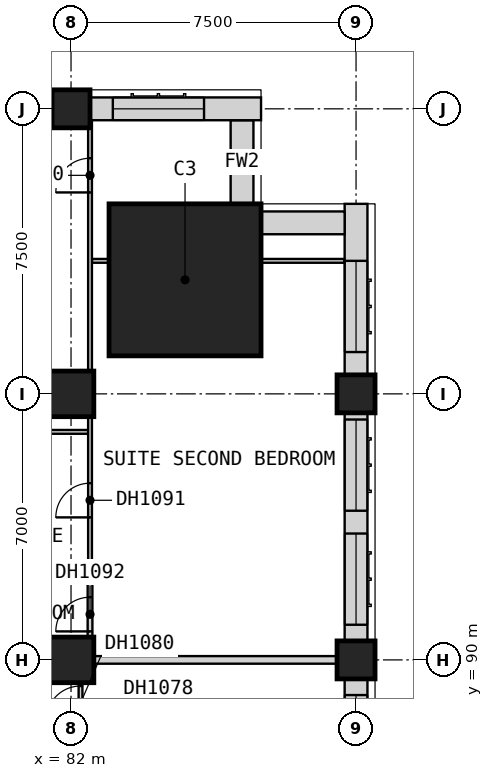
"""IFC4 building model, lengths in metres.
Left out: names, types, materials, properties, quantities, classifications, styles, units other than length and angle.
Written with IfcOpenShell. Run it as: python <this file> out.ifc"""

import sys

from ifc_helpers import new_model, si_unit, direction, frame, frame_2d, origin, origin_2d, place, context, subcontext, project, spatial, rectangle, extrude, element, fill, save


model = new_model("IFC4")
c1 = context("Model", 3, precision=1e-05, world=origin(), true_north=direction((0.0, 1.0)))
c2 = subcontext(c1, "Body", "Model", "MODEL_VIEW")
j1 = project(units=[si_unit("LENGTHUNIT", "METRE"), si_unit("PLANEANGLEUNIT", "RADIAN")], contexts=[c1])
p1 = place(None, origin())
s1 = spatial("IfcSite", under=j1, at=p1, CompositionType="ELEMENT")
p2 = place(p1, origin())
s2 = spatial("IfcBuilding", under=s1, at=p2, CompositionType="ELEMENT")
p3 = place(p2, frame((0.0, 0.0, 48.4)))
s3 = spatial("IfcBuildingStorey", under=s2, at=p3, CompositionType="ELEMENT", Elevation=48.4)
for number, where, z_axis, x_axis in (
    (1, (82.0, 90.0, 0.0), (0.0, 0.0, 1.0), (1.0, 0.0, 0.0)),
    (2, (82.0, 97.0, 0.0), (0.0, 0.0, 1.0), (1.0, 0.0, 0.0)),
):
    element("IfcColumn", number, at=place(p3, frame(where, z_axis=z_axis, x_axis=x_axis)), inside=s3, PredefinedType="COLUMN", context=c2, shape_type="SweptSolid", body=[
        extrude(rectangle(XDim=1.2, YDim=1.2, at=origin_2d()), origin(), (0.0, 0.0, 1.0), 3.6),
    ])
for number, where, z_axis, x_axis in (
    (3, (82.0, 104.5, 0.0), (0.0, 0.0, 1.0), (1.0, 0.0, 0.0)),
    (4, (89.5, 90.0, 0.0), (0.0, 0.0, 1.0), (1.0, 0.0, 0.0)),
    (5, (89.5, 97.0, 0.0), (0.0, 0.0, 1.0), (1.0, 0.0, 0.0)),
):
    element("IfcColumn", number, at=place(p3, frame(where, z_axis=z_axis, x_axis=x_axis)), inside=s3, PredefinedType="COLUMN", context=c2, shape_type="SweptSolid", body=[
        extrude(rectangle(XDim=1.0, YDim=1.0, at=origin_2d()), origin(), (0.0, 0.0, 1.0), 3.6),
    ])
p4 = place(p3, frame((85.0, 100.0, 0.0), z_axis=(0.0, 0.0, 1.0), x_axis=(1.0, 0.0, 0.0)))
e6 = element("IfcColumn", 6, at=p4, inside=s3, PredefinedType="COLUMN", context=c2, shape_type="SweptSolid", body=[
    extrude(rectangle(XDim=4.0, YDim=4.0, at=origin_2d()), origin(), (0.0, 0.0, 1.0), 3.6),
])
p5 = place(p3, frame((89.5, 83.0, 0.0), z_axis=(0.0, 0.0, 1.0), x_axis=(0.0, 1.0, 0.0)))
e7 = element("IfcWall", 7, at=p5, inside=s3, PredefinedType="SOLIDWALL", context=c2, shape_type="SweptSolid", body=[
    extrude(rectangle(XDim=6.5, YDim=0.6, at=frame_2d((3.25, 0.0))), origin(), (0.0, 0.0, 1.0), 2.85),
])
p6 = place(p5, frame((0.425, 0.0, 0.8)))
e8 = element("IfcOpeningElement", 8, at=p6, cuts=e7, PredefinedType="OPENING", context=c2, shape_type="SweptSolid", body=[
    extrude(rectangle(XDim=2.4, YDim=1.8, at=frame_2d((1.2, 0.9))), frame((0.0, 0.31, 0.0), z_axis=(0.0, -1.0, 0.0), x_axis=(1.0, 0.0, 0.0)), (0.0, 0.0, 1.0), 0.62),
])
p7 = place(p5, frame((3.675, 0.0, 0.8)))
e9 = element("IfcOpeningElement", 9, at=p7, cuts=e7, PredefinedType="OPENING", context=c2, shape_type="SweptSolid", body=[
    extrude(rectangle(XDim=2.4, YDim=1.8, at=frame_2d((1.2, 0.9))), frame((0.0, 0.31, 0.0), z_axis=(0.0, -1.0, 0.0), x_axis=(1.0, 0.0, 0.0)), (0.0, 0.0, 1.0), 0.62),
])
p8 = place(p3, frame((89.5, 90.5, 0.0), z_axis=(0.0, 0.0, 1.0), x_axis=(0.0, 1.0, 0.0)))
e10 = element("IfcWall", 10, at=p8, inside=s3, PredefinedType="SOLIDWALL", context=c2, shape_type="SweptSolid", body=[
    extrude(rectangle(XDim=6.0, YDim=0.6, at=frame_2d((3.0, 0.0))), origin(), (0.0, 0.0, 1.0), 2.85),
])
p9 = place(p8, frame((0.425, 0.0, 0.8)))
e11 = element("IfcOpeningElement", 11, at=p9, cuts=e10, PredefinedType="OPENING", context=c2, shape_type="SweptSolid", body=[
    extrude(rectangle(XDim=2.4, YDim=1.8, at=frame_2d((1.2, 0.9))), frame((0.0, 0.31, 0.0), z_axis=(0.0, -1.0, 0.0), x_axis=(1.0, 0.0, 0.0)), (0.0, 0.0, 1.0), 0.62),
])
p10 = place(p8, frame((3.425, 0.0, 0.8)))
e12 = element("IfcOpeningElement", 12, at=p10, cuts=e10, PredefinedType="OPENING", context=c2, shape_type="SweptSolid", body=[
    extrude(rectangle(XDim=2.4, YDim=1.8, at=frame_2d((1.2, 0.9))), frame((0.0, 0.31, 0.0), z_axis=(0.0, -1.0, 0.0), x_axis=(1.0, 0.0, 0.0)), (0.0, 0.0, 1.0), 0.62),
])
p11 = place(p3, frame((89.5, 97.5, 0.0), z_axis=(0.0, 0.0, 1.0), x_axis=(0.0, 1.0, 0.0)))
e13 = element("IfcWall", 13, at=p11, inside=s3, PredefinedType="SOLIDWALL", context=c2, shape_type="SweptSolid", body=[
    extrude(rectangle(XDim=4.5, YDim=0.6, at=frame_2d((2.25, 0.0))), origin(), (0.0, 0.0, 1.0), 3.35),
])
p12 = place(p11, frame((0.6, 0.0, 0.8)))
e14 = element("IfcOpeningElement", 14, at=p12, cuts=e13, PredefinedType="OPENING", context=c2, shape_type="SweptSolid", body=[
    extrude(rectangle(XDim=2.4, YDim=1.8, at=frame_2d((1.2, 0.9))), frame((0.0, 0.31, 0.0), z_axis=(0.0, -1.0, 0.0), x_axis=(1.0, 0.0, 0.0)), (0.0, 0.0, 1.0), 0.62),
])
for number, where, z_axis, x_axis in (
    (15, (89.2, 101.5, 0.0), (0.0, 0.0, 1.0), (-1.0, 0.0, 0.0)),
    (16, (86.5, 102.0, 0.0), (0.0, 0.0, 1.0), (0.0, 1.0, 0.0)),
):
    element("IfcWall", number, at=place(p3, frame(where, z_axis=z_axis, x_axis=x_axis)), inside=s3, PredefinedType="SOLIDWALL", context=c2, shape_type="SweptSolid", body=[
        extrude(rectangle(XDim=2.2, YDim=0.6, at=frame_2d((1.1, 0.0))), origin(), (0.0, 0.0, 1.0), 3.35),
    ])
p13 = place(p3, frame((87.0, 104.5, 0.0), z_axis=(0.0, 0.0, 1.0), x_axis=(-1.0, 0.0, 0.0)))
e17 = element("IfcWall", 17, at=p13, inside=s3, PredefinedType="SOLIDWALL", context=c2, shape_type="SweptSolid", body=[
    extrude(rectangle(XDim=4.5, YDim=0.6, at=frame_2d((2.25, 0.0))), origin(), (0.0, 0.0, 1.0), 3.35),
])
p14 = place(p13, frame((1.5, 0.0, 0.8)))
e18 = element("IfcOpeningElement", 18, at=p14, cuts=e17, PredefinedType="OPENING", context=c2, shape_type="SweptSolid", body=[
    extrude(rectangle(XDim=2.4, YDim=1.8, at=frame_2d((1.2, 0.9))), frame((0.0, 0.31, 0.0), z_axis=(0.0, -1.0, 0.0), x_axis=(1.0, 0.0, 0.0)), (0.0, 0.0, 1.0), 0.62),
])
p15 = place(p3, frame((77.475, 90.0, 0.0), z_axis=(0.0, 0.0, 1.0), x_axis=(1.0, 0.0, 0.0)))
e19 = element("IfcWall", 19, at=p15, inside=s3, PredefinedType="PARTITIONING", context=c2, shape_type="SweptSolid", body=[
    extrude(rectangle(XDim=12.525, YDim=0.2, at=frame_2d((6.262, 0.0))), origin(), (0.0, 0.0, 1.0), 3.35),
])
p16 = place(p3, frame((75.1, 96.0, 0.0), z_axis=(0.0, 0.0, 1.0), x_axis=(1.0, 0.0, 0.0)))
e20 = element("IfcWall", 20, at=p16, inside=s3, PredefinedType="PARTITIONING", context=c2, shape_type="SweptSolid", body=[
    extrude(rectangle(XDim=7.35, YDim=0.1, at=frame_2d((3.675, 0.0))), origin(), (0.0, 0.0, 1.0), 3.35),
])
p17 = place(p16, frame((0.65, 0.0, 0.0)))
e21 = element("IfcOpeningElement", 21, at=p17, cuts=e20, PredefinedType="OPENING", context=c2, shape_type="SweptSolid", body=[
    extrude(rectangle(XDim=0.9, YDim=2.1, at=frame_2d((0.45, 1.05))), frame((0.0, 0.06, 0.0), z_axis=(0.0, -1.0, 0.0), x_axis=(1.0, 0.0, 0.0)), (0.0, 0.0, 1.0), 0.12),
])
p18 = place(p3, frame((82.55, 100.5, 0.0), z_axis=(0.0, 0.0, 1.0), x_axis=(1.0, 0.0, 0.0)))
e22 = element("IfcWall", 22, at=p18, inside=s3, PredefinedType="PARTITIONING", context=c2, shape_type="SweptSolid", body=[
    extrude(rectangle(XDim=6.64, YDim=0.1, at=frame_2d((3.32, 0.0))), origin(), (0.0, 0.0, 1.0), 3.35),
])
p19 = place(p3, frame((82.25, 88.188, 0.0), z_axis=(0.0, 0.0, 1.0), x_axis=(0.0, 1.0, 0.0)))
e23 = element("IfcWall", 23, at=p19, inside=s3, PredefinedType="PARTITIONING", context=c2, shape_type="SweptSolid", body=[
    extrude(rectangle(XDim=1.712, YDim=0.1, at=frame_2d((0.856, 0.0))), origin(), (0.0, 0.0, 1.0), 3.35),
])
p20 = place(p19, frame((0.225, 0.0, 0.0)))
e24 = element("IfcOpeningElement", 24, at=p20, cuts=e23, PredefinedType="OPENING", context=c2, shape_type="SweptSolid", body=[
    extrude(rectangle(XDim=0.9, YDim=2.1, at=frame_2d((0.45, 1.05))), frame((0.0, 0.06, 0.0), z_axis=(0.0, -1.0, 0.0), x_axis=(1.0, 0.0, 0.0)), (0.0, 0.0, 1.0), 0.12),
])
p21 = place(p3, frame((82.5, 92.462, 0.0), z_axis=(0.0, 0.0, 1.0), x_axis=(0.0, 1.0, 0.0)))
e25 = element("IfcWall", 25, at=p21, inside=s3, PredefinedType="PARTITIONING", context=c2, shape_type="SweptSolid", body=[
    extrude(rectangle(XDim=11.728, YDim=0.1, at=frame_2d((5.864, 0.0))), origin(), (0.0, 0.0, 1.0), 3.35),
])
p22 = place(p21, frame((9.837, 0.0, 0.0)))
e26 = element("IfcOpeningElement", 26, at=p22, cuts=e25, PredefinedType="OPENING", context=c2, shape_type="SweptSolid", body=[
    extrude(rectangle(XDim=0.9, YDim=2.1, at=frame_2d((0.45, 1.05))), frame((0.0, 0.06, 0.0), z_axis=(0.0, -1.0, 0.0), x_axis=(1.0, 0.0, 0.0)), (0.0, 0.0, 1.0), 0.12),
])
p23 = place(p21, frame((1.288, 0.0, 0.0)))
e27 = element("IfcOpeningElement", 27, at=p23, cuts=e25, PredefinedType="OPENING", context=c2, shape_type="SweptSolid", body=[
    extrude(rectangle(XDim=0.9, YDim=2.1, at=frame_2d((0.45, 1.05))), frame((0.0, 0.06, 0.0), z_axis=(0.0, -1.0, 0.0), x_axis=(1.0, 0.0, 0.0)), (0.0, 0.0, 1.0), 0.12),
])
p24 = place(p3, frame((77.475, 92.4, 0.0), z_axis=(0.0, 0.0, 1.0), x_axis=(1.0, 0.0, 0.0)))
e28 = element("IfcWall", 28, at=p24, inside=s3, PredefinedType="PARTITIONING", context=c2, shape_type="SweptSolid", body=[
    extrude(rectangle(XDim=5.025, YDim=0.125, at=frame_2d((2.512, 0.0))), origin(), (0.0, 0.0, 1.0), 3.35),
])
p25 = place(p3, frame((82.5, 90.1, 0.0), z_axis=(0.0, 0.0, 1.0), x_axis=(0.0, 1.0, 0.0)))
e29 = element("IfcWall", 29, at=p25, inside=s3, PredefinedType="PARTITIONING", context=c2, shape_type="SweptSolid", body=[
    extrude(rectangle(XDim=2.237, YDim=0.125, at=frame_2d((1.119, 0.0))), origin(), (0.0, 0.0, 1.0), 3.35),
])
p26 = place(p25, frame((0.65, 0.0, 0.0)))
e30 = element("IfcOpeningElement", 30, at=p26, cuts=e29, PredefinedType="OPENING", context=c2, shape_type="SweptSolid", body=[
    extrude(rectangle(XDim=0.9, YDim=2.1, at=frame_2d((0.45, 1.05))), frame((0.0, 0.073, 0.0), z_axis=(0.0, -1.0, 0.0), x_axis=(1.0, 0.0, 0.0)), (0.0, 0.0, 1.0), 0.145),
])
p27 = place(p7, origin())
e31 = element("IfcWindow", 31, at=p27, inside=s3, PartitioningType="SINGLE_PANEL", PredefinedType="WINDOW", context=c2, shape_type="SweptSolid", body=[
    extrude(rectangle(XDim=2.4, YDim=1.8, at=frame_2d((1.2, 0.9))), frame((0.0, -0.07, 0.0), z_axis=(0.0, -1.0, 0.0), x_axis=(1.0, 0.0, 0.0)), (0.0, 0.0, 1.0), 0.06),
])
fill(e9, e31)
p28 = place(p9, origin())
e32 = element("IfcWindow", 32, at=p28, inside=s3, PartitioningType="SINGLE_PANEL", PredefinedType="WINDOW", context=c2, shape_type="SweptSolid", body=[
    extrude(rectangle(XDim=2.4, YDim=1.8, at=frame_2d((1.2, 0.9))), frame((0.0, -0.07, 0.0), z_axis=(0.0, -1.0, 0.0), x_axis=(1.0, 0.0, 0.0)), (0.0, 0.0, 1.0), 0.06),
])
fill(e11, e32)
p29 = place(p10, origin())
e33 = element("IfcWindow", 33, at=p29, inside=s3, PartitioningType="SINGLE_PANEL", PredefinedType="WINDOW", context=c2, shape_type="SweptSolid", body=[
    extrude(rectangle(XDim=2.4, YDim=1.8, at=frame_2d((1.2, 0.9))), frame((0.0, -0.07, 0.0), z_axis=(0.0, -1.0, 0.0), x_axis=(1.0, 0.0, 0.0)), (0.0, 0.0, 1.0), 0.06),
])
fill(e12, e33)
p30 = place(p12, origin())
e34 = element("IfcWindow", 34, at=p30, inside=s3, PartitioningType="SINGLE_PANEL", PredefinedType="WINDOW", context=c2, shape_type="SweptSolid", body=[
    extrude(rectangle(XDim=2.4, YDim=1.8, at=frame_2d((1.2, 0.9))), frame((0.0, -0.07, 0.0), z_axis=(0.0, -1.0, 0.0), x_axis=(1.0, 0.0, 0.0)), (0.0, 0.0, 1.0), 0.06),
])
fill(e14, e34)
p31 = place(p14, origin())
e35 = element("IfcWindow", 35, at=p31, inside=s3, PartitioningType="SINGLE_PANEL", PredefinedType="WINDOW", context=c2, shape_type="SweptSolid", body=[
    extrude(rectangle(XDim=2.4, YDim=1.8, at=frame_2d((1.2, 0.9))), frame((0.0, -0.07, 0.0), z_axis=(0.0, -1.0, 0.0), x_axis=(1.0, 0.0, 0.0)), (0.0, 0.0, 1.0), 0.06),
])
fill(e18, e35)
p32 = place(p20, origin())
e36 = element("IfcDoor", 36, at=p32, inside=s3, OperationType="SINGLE_SWING_LEFT", PredefinedType="DOOR", context=c2, shape_type="SweptSolid", body=[
    extrude(rectangle(XDim=0.9, YDim=2.1, at=frame_2d((0.45, 1.05))), frame((0.0, 0.025, 0.0), z_axis=(0.0, -1.0, 0.0), x_axis=(1.0, 0.0, 0.0)), (0.0, 0.0, 1.0), 0.05),
])
fill(e24, e36)
p33 = place(p22, origin())
e37 = element("IfcDoor", 37, at=p33, inside=s3, OperationType="SINGLE_SWING_LEFT", PredefinedType="DOOR", context=c2, shape_type="SweptSolid", body=[
    extrude(rectangle(XDim=0.9, YDim=2.1, at=frame_2d((0.45, 1.05))), frame((0.0, 0.025, 0.0), z_axis=(0.0, -1.0, 0.0), x_axis=(1.0, 0.0, 0.0)), (0.0, 0.0, 1.0), 0.05),
])
fill(e26, e37)
p34 = place(p23, origin())
e38 = element("IfcDoor", 38, at=p34, inside=s3, OperationType="SINGLE_SWING_RIGHT", PredefinedType="DOOR", context=c2, shape_type="SweptSolid", body=[
    extrude(rectangle(XDim=0.9, YDim=2.1, at=frame_2d((0.45, 1.05))), frame((0.0, 0.025, 0.0), z_axis=(0.0, -1.0, 0.0), x_axis=(1.0, 0.0, 0.0)), (0.0, 0.0, 1.0), 0.05),
])
fill(e27, e38)
p35 = place(p26, origin())
e39 = element("IfcDoor", 39, at=p35, inside=s3, OperationType="SINGLE_SWING_LEFT", PredefinedType="DOOR", context=c2, shape_type="SweptSolid", body=[
    extrude(rectangle(XDim=0.9, YDim=2.1, at=frame_2d((0.45, 1.05))), frame((0.0, 0.025, 0.0), z_axis=(0.0, -1.0, 0.0), x_axis=(1.0, 0.0, 0.0)), (0.0, 0.0, 1.0), 0.05),
])
fill(e30, e39)
save(model, sys.argv[1])
